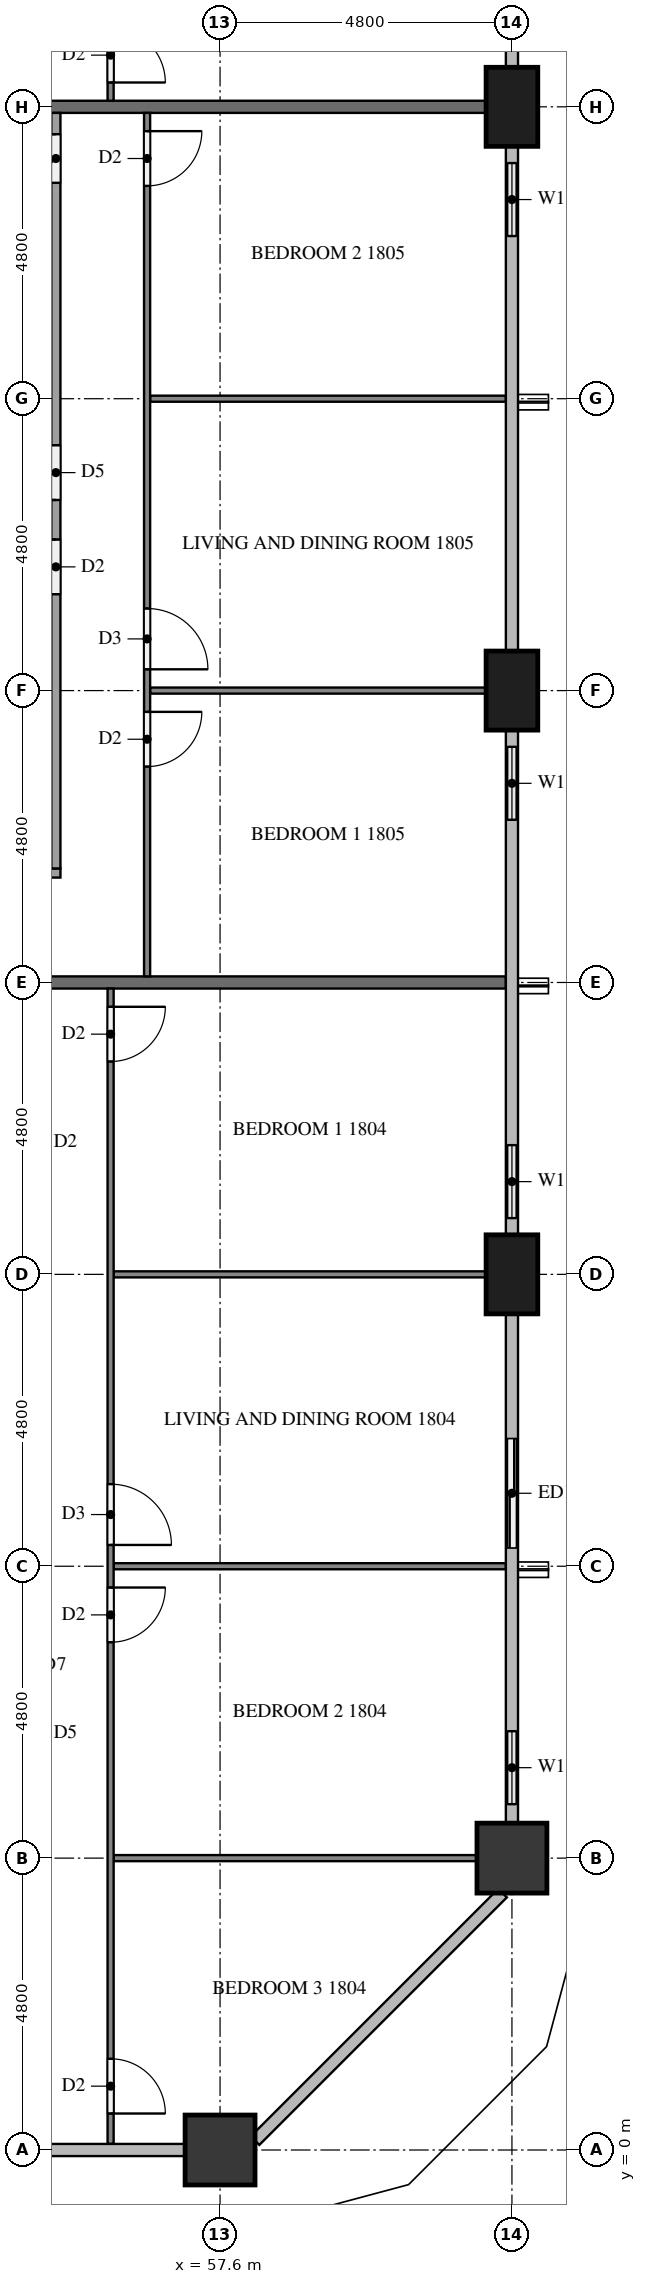
"""IFC4 building model, lengths in metres.
Left out: names, types, materials, properties, quantities, classifications, styles, units other than length and angle.
Written with IfcOpenShell. Run it as: python <this file> out.ifc"""

import sys

from ifc_helpers import new_model, si_unit, direction, frame, frame_2d, origin, origin_2d, place, context, subcontext, project, spatial, rectangle, extrude, element, fill, save


model = new_model("IFC4")
c1 = context("Model", 3, precision=1e-05, world=origin(), true_north=direction((0.0, 1.0)))
c2 = subcontext(c1, "Body", "Model", "MODEL_VIEW")
j1 = project(units=[si_unit("LENGTHUNIT", "METRE"), si_unit("PLANEANGLEUNIT", "RADIAN")], contexts=[c1])
p1 = place(None, origin())
s1 = spatial("IfcSite", under=j1, at=p1, CompositionType="ELEMENT")
p2 = place(p1, origin())
s2 = spatial("IfcBuilding", under=s1, at=p2, CompositionType="ELEMENT")
p3 = place(p2, frame((0.0, 0.0, 73.3)))
s3 = spatial("IfcBuildingStorey", under=s2, at=p3, CompositionType="ELEMENT", Elevation=73.3)
for number, where, z_axis, x_axis in (
    (1, (57.6, 0.0, 0.0), (0.0, 0.0, 1.0), (1.0, 0.0, 0.0)),
    (2, (62.4, 4.8, 0.0), (0.0, 0.0, 1.0), (1.0, 0.0, 0.0)),
):
    element("IfcColumn", number, at=place(p3, frame(where, z_axis=z_axis, x_axis=x_axis)), inside=s3, PredefinedType="COLUMN", context=c2, shape_type="SweptSolid", body=[
        extrude(rectangle(XDim=1.15, YDim=1.15, at=origin_2d()), origin(), (0.0, 0.0, 1.0), 3.2),
    ])
for number, where, z_axis, x_axis in (
    (3, (62.4, 14.4, 0.0), (0.0, 0.0, 1.0), (0.0, 1.0, 0.0)),
    (4, (62.4, 24.0, 0.0), (0.0, 0.0, 1.0), (0.0, 1.0, 0.0)),
    (5, (62.4, 33.6, 0.0), (0.0, 0.0, 1.0), (0.0, 1.0, 0.0)),
):
    element("IfcColumn", number, at=place(p3, frame(where, z_axis=z_axis, x_axis=x_axis)), inside=s3, PredefinedType="COLUMN", context=c2, shape_type="SweptSolid", body=[
        extrude(rectangle(XDim=1.3, YDim=0.85, at=origin_2d()), origin(), (0.0, 0.0, 1.0), 3.2),
    ])
p4 = place(p3, frame((62.4, 5.375, 0.0), z_axis=(0.0, 0.0, 1.0), x_axis=(0.0, 1.0, 0.0)))
e6 = element("IfcWall", 6, at=p4, inside=s3, PredefinedType="SOLIDWALL", context=c2, shape_type="SweptSolid", body=[
    extrude(rectangle(XDim=1.825, YDim=0.15, at=frame_2d((0.913, 0.0))), origin(), (0.0, 0.0, 1.0), 3.2),
])
p5 = place(p4, frame((0.312, 0.0, 0.9)))
e7 = element("IfcOpeningElement", 7, at=p5, cuts=e6, PredefinedType="OPENING", context=c2, shape_type="SweptSolid", body=[
    extrude(rectangle(XDim=1.2, YDim=1.4, at=frame_2d((0.6, 0.7))), frame((0.0, 0.085, 0.0), z_axis=(0.0, -1.0, 0.0), x_axis=(1.0, 0.0, 0.0)), (0.0, 0.0, 1.0), 0.17),
])
p6 = place(p3, frame((62.4, 9.6, 0.0), z_axis=(0.0, 0.0, 1.0), x_axis=(0.0, 1.0, 0.0)))
e8 = element("IfcWall", 8, at=p6, inside=s3, PredefinedType="SOLIDWALL", context=c2, shape_type="SweptSolid", body=[
    extrude(rectangle(XDim=2.4, YDim=0.15, at=frame_2d((1.2, 0.0))), origin(), (0.0, 0.0, 1.0), 3.2),
])
p7 = place(p6, frame((0.3, 0.0, 0.0)))
e9 = element("IfcOpeningElement", 9, at=p7, cuts=e8, PredefinedType="OPENING", context=c2, shape_type="SweptSolid", body=[
    extrude(rectangle(XDim=1.8, YDim=2.4, at=frame_2d((0.9, 1.2))), frame((0.0, 0.085, 0.0), z_axis=(0.0, -1.0, 0.0), x_axis=(1.0, 0.0, 0.0)), (0.0, 0.0, 1.0), 0.17),
])
p8 = place(p3, frame((62.4, 15.05, 0.0), z_axis=(0.0, 0.0, 1.0), x_axis=(0.0, 1.0, 0.0)))
e10 = element("IfcWall", 10, at=p8, inside=s3, PredefinedType="SOLIDWALL", context=c2, shape_type="SweptSolid", body=[
    extrude(rectangle(XDim=1.75, YDim=0.15, at=frame_2d((0.875, 0.0))), origin(), (0.0, 0.0, 1.0), 3.2),
])
p9 = place(p8, frame((0.275, 0.0, 0.9)))
e11 = element("IfcOpeningElement", 11, at=p9, cuts=e10, PredefinedType="OPENING", context=c2, shape_type="SweptSolid", body=[
    extrude(rectangle(XDim=1.2, YDim=1.4, at=frame_2d((0.6, 0.7))), frame((0.0, 0.085, 0.0), z_axis=(0.0, -1.0, 0.0), x_axis=(1.0, 0.0, 0.0)), (0.0, 0.0, 1.0), 0.17),
])
p10 = place(p3, frame((62.4, 21.6, 0.0), z_axis=(0.0, 0.0, 1.0), x_axis=(0.0, 1.0, 0.0)))
e12 = element("IfcWall", 12, at=p10, inside=s3, PredefinedType="SOLIDWALL", context=c2, shape_type="SweptSolid", body=[
    extrude(rectangle(XDim=1.75, YDim=0.15, at=frame_2d((0.875, 0.0))), origin(), (0.0, 0.0, 1.0), 3.2),
])
p11 = place(p10, frame((0.275, 0.0, 0.9)))
e13 = element("IfcOpeningElement", 13, at=p11, cuts=e12, PredefinedType="OPENING", context=c2, shape_type="SweptSolid", body=[
    extrude(rectangle(XDim=1.2, YDim=1.4, at=frame_2d((0.6, 0.7))), frame((0.0, 0.085, 0.0), z_axis=(0.0, -1.0, 0.0), x_axis=(1.0, 0.0, 0.0)), (0.0, 0.0, 1.0), 0.17),
])
p12 = place(p3, frame((62.4, 31.2, 0.0), z_axis=(0.0, 0.0, 1.0), x_axis=(0.0, 1.0, 0.0)))
e14 = element("IfcWall", 14, at=p12, inside=s3, PredefinedType="SOLIDWALL", context=c2, shape_type="SweptSolid", body=[
    extrude(rectangle(XDim=1.75, YDim=0.15, at=frame_2d((0.875, 0.0))), origin(), (0.0, 0.0, 1.0), 3.2),
])
p13 = place(p12, frame((0.275, 0.0, 0.9)))
e15 = element("IfcOpeningElement", 15, at=p13, cuts=e14, PredefinedType="OPENING", context=c2, shape_type="SweptSolid", body=[
    extrude(rectangle(XDim=1.2, YDim=1.4, at=frame_2d((0.6, 0.7))), frame((0.0, 0.085, 0.0), z_axis=(0.0, -1.0, 0.0), x_axis=(1.0, 0.0, 0.0)), (0.0, 0.0, 1.0), 0.17),
])
p14 = place(p3, frame((62.4, 34.25, 0.0), z_axis=(0.0, 0.0, 1.0), x_axis=(0.0, 1.0, 0.0)))
e16 = element("IfcWall", 16, at=p14, inside=s3, PredefinedType="SOLIDWALL", context=c2, shape_type="SweptSolid", body=[
    extrude(rectangle(XDim=1.75, YDim=0.15, at=frame_2d((0.875, 0.0))), origin(), (0.0, 0.0, 1.0), 3.2),
])
p15 = place(p14, frame((0.275, 0.0, 0.9)))
e17 = element("IfcOpeningElement", 17, at=p15, cuts=e16, PredefinedType="OPENING", context=c2, shape_type="SweptSolid", body=[
    extrude(rectangle(XDim=1.2, YDim=1.4, at=frame_2d((0.6, 0.7))), frame((0.0, 0.085, 0.0), z_axis=(0.0, -1.0, 0.0), x_axis=(1.0, 0.0, 0.0)), (0.0, 0.0, 1.0), 0.17),
])
p16 = place(p3, frame((50.5, 19.2, 0.0), z_axis=(0.0, 0.0, 1.0), x_axis=(1.0, 0.0, 0.0)))
e18 = element("IfcWall", 18, at=p16, inside=s3, PredefinedType="PARTITIONING", context=c2, shape_type="SweptSolid", body=[
    extrude(rectangle(XDim=11.8, YDim=0.2, at=frame_2d((5.9, 0.0))), origin(), (0.0, 0.0, 1.0), 3.2),
])
p17 = place(p3, frame((50.5, 33.6, 0.0), z_axis=(0.0, 0.0, 1.0), x_axis=(1.0, 0.0, 0.0)))
e19 = element("IfcWall", 19, at=p17, inside=s3, PredefinedType="PARTITIONING", context=c2, shape_type="SweptSolid", body=[
    extrude(rectangle(XDim=11.475, YDim=0.2, at=frame_2d((5.738, 0.0))), origin(), (0.0, 0.0, 1.0), 3.2),
])
p18 = place(p3, frame((55.85, 14.4, 0.0), z_axis=(0.0, 0.0, 1.0), x_axis=(1.0, 0.0, 0.0)))
e20 = element("IfcWall", 20, at=p18, inside=s3, PredefinedType="PARTITIONING", context=c2, shape_type="SweptSolid", body=[
    extrude(rectangle(XDim=6.125, YDim=0.1, at=frame_2d((3.062, 0.0))), origin(), (0.0, 0.0, 1.0), 3.2),
])
p19 = place(p3, frame((55.85, 9.6, 0.0), z_axis=(0.0, 0.0, 1.0), x_axis=(1.0, 0.0, 0.0)))
e21 = element("IfcWall", 21, at=p19, inside=s3, PredefinedType="PARTITIONING", context=c2, shape_type="SweptSolid", body=[
    extrude(rectangle(XDim=6.45, YDim=0.1, at=frame_2d((3.225, 0.0))), origin(), (0.0, 0.0, 1.0), 3.2),
])
p20 = place(p3, frame((55.85, 4.8, 0.0), z_axis=(0.0, 0.0, 1.0), x_axis=(1.0, 0.0, 0.0)))
e22 = element("IfcWall", 22, at=p20, inside=s3, PredefinedType="PARTITIONING", context=c2, shape_type="SweptSolid", body=[
    extrude(rectangle(XDim=5.975, YDim=0.1, at=frame_2d((2.987, 0.0))), origin(), (0.0, 0.0, 1.0), 3.2),
])
p21 = place(p3, frame((55.8, 19.1, 0.0), z_axis=(0.0, 0.0, 1.0), x_axis=(0.0, -1.0, 0.0)))
e23 = element("IfcWall", 23, at=p21, inside=s3, PredefinedType="PARTITIONING", context=c2, shape_type="SweptSolid", body=[
    extrude(rectangle(XDim=19.0, YDim=0.1, at=frame_2d((9.5, 0.0))), origin(), (0.0, 0.0, 1.0), 3.2),
])
p22 = place(p21, frame((0.3, 0.0, 0.0)))
e24 = element("IfcOpeningElement", 24, at=p22, cuts=e23, PredefinedType="OPENING", context=c2, shape_type="SweptSolid", body=[
    extrude(rectangle(XDim=0.9, YDim=2.1, at=frame_2d((0.45, 1.05))), frame((0.0, 0.06, 0.0), z_axis=(0.0, -1.0, 0.0), x_axis=(1.0, 0.0, 0.0)), (0.0, 0.0, 1.0), 0.12),
])
p23 = place(p21, frame((8.15, 0.0, 0.0)))
e25 = element("IfcOpeningElement", 25, at=p23, cuts=e23, PredefinedType="OPENING", context=c2, shape_type="SweptSolid", body=[
    extrude(rectangle(XDim=1.0, YDim=2.1, at=frame_2d((0.5, 1.05))), frame((0.0, 0.06, 0.0), z_axis=(0.0, -1.0, 0.0), x_axis=(1.0, 0.0, 0.0)), (0.0, 0.0, 1.0), 0.12),
])
p24 = place(p21, frame((9.85, 0.0, 0.0)))
e26 = element("IfcOpeningElement", 26, at=p24, cuts=e23, PredefinedType="OPENING", context=c2, shape_type="SweptSolid", body=[
    extrude(rectangle(XDim=0.9, YDim=2.1, at=frame_2d((0.45, 1.05))), frame((0.0, 0.06, 0.0), z_axis=(0.0, -1.0, 0.0), x_axis=(1.0, 0.0, 0.0)), (0.0, 0.0, 1.0), 0.12),
])
p25 = place(p21, frame((17.6, 0.0, 0.0)))
e27 = element("IfcOpeningElement", 27, at=p25, cuts=e23, PredefinedType="OPENING", context=c2, shape_type="SweptSolid", body=[
    extrude(rectangle(XDim=0.9, YDim=2.1, at=frame_2d((0.45, 1.05))), frame((0.0, 0.06, 0.0), z_axis=(0.0, -1.0, 0.0), x_axis=(1.0, 0.0, 0.0)), (0.0, 0.0, 1.0), 0.12),
])
p26 = place(p3, frame((56.45, 24.0, 0.0), z_axis=(0.0, 0.0, 1.0), x_axis=(1.0, 0.0, 0.0)))
e28 = element("IfcWall", 28, at=p26, inside=s3, PredefinedType="PARTITIONING", context=c2, shape_type="SweptSolid", body=[
    extrude(rectangle(XDim=5.525, YDim=0.1, at=frame_2d((2.763, 0.0))), origin(), (0.0, 0.0, 1.0), 3.2),
])
p27 = place(p3, frame((56.45, 28.8, 0.0), z_axis=(0.0, 0.0, 1.0), x_axis=(1.0, 0.0, 0.0)))
e29 = element("IfcWall", 29, at=p27, inside=s3, PredefinedType="PARTITIONING", context=c2, shape_type="SweptSolid", body=[
    extrude(rectangle(XDim=5.85, YDim=0.1, at=frame_2d((2.925, 0.0))), origin(), (0.0, 0.0, 1.0), 3.2),
])
p28 = place(p3, frame((56.4, 33.5, 0.0), z_axis=(0.0, 0.0, 1.0), x_axis=(0.0, -1.0, 0.0)))
e30 = element("IfcWall", 30, at=p28, inside=s3, PredefinedType="PARTITIONING", context=c2, shape_type="SweptSolid", body=[
    extrude(rectangle(XDim=14.2, YDim=0.1, at=frame_2d((7.1, 0.0))), origin(), (0.0, 0.0, 1.0), 3.2),
])
p29 = place(p28, frame((9.85, 0.0, 0.0)))
e31 = element("IfcOpeningElement", 31, at=p29, cuts=e30, PredefinedType="OPENING", context=c2, shape_type="SweptSolid", body=[
    extrude(rectangle(XDim=0.9, YDim=2.1, at=frame_2d((0.45, 1.05))), frame((0.0, 0.06, 0.0), z_axis=(0.0, -1.0, 0.0), x_axis=(1.0, 0.0, 0.0)), (0.0, 0.0, 1.0), 0.12),
])
p30 = place(p28, frame((8.15, 0.0, 0.0)))
e32 = element("IfcOpeningElement", 32, at=p30, cuts=e30, PredefinedType="OPENING", context=c2, shape_type="SweptSolid", body=[
    extrude(rectangle(XDim=1.0, YDim=2.1, at=frame_2d((0.5, 1.05))), frame((0.0, 0.06, 0.0), z_axis=(0.0, -1.0, 0.0), x_axis=(1.0, 0.0, 0.0)), (0.0, 0.0, 1.0), 0.12),
])
p31 = place(p28, frame((0.3, 0.0, 0.0)))
e33 = element("IfcOpeningElement", 33, at=p31, cuts=e30, PredefinedType="OPENING", context=c2, shape_type="SweptSolid", body=[
    extrude(rectangle(XDim=0.9, YDim=2.1, at=frame_2d((0.45, 1.05))), frame((0.0, 0.06, 0.0), z_axis=(0.0, -1.0, 0.0), x_axis=(1.0, 0.0, 0.0)), (0.0, 0.0, 1.0), 0.12),
])
p32 = place(p3, frame((50.5, 21.0, 0.0), z_axis=(0.0, 0.0, 1.0), x_axis=(1.0, 0.0, 0.0)))
e34 = element("IfcWall", 34, at=p32, inside=s3, PredefinedType="PARTITIONING", context=c2, shape_type="SweptSolid", body=[
    extrude(rectangle(XDim=4.475, YDim=0.15, at=frame_2d((2.238, 0.0))), origin(), (0.0, 0.0, 1.0), 3.2),
])
p33 = place(p3, frame((54.9, 21.075, 0.0), z_axis=(0.0, 0.0, 1.0), x_axis=(0.0, 1.0, 0.0)))
e35 = element("IfcWall", 35, at=p33, inside=s3, PredefinedType="PARTITIONING", context=c2, shape_type="SweptSolid", body=[
    extrude(rectangle(XDim=12.425, YDim=0.15, at=frame_2d((6.212, 0.0))), origin(), (0.0, 0.0, 1.0), 3.2),
])
p34 = place(p33, frame((4.51, 0.0, 0.0)))
e36 = element("IfcOpeningElement", 36, at=p34, cuts=e35, PredefinedType="OPENING", context=c2, shape_type="SweptSolid", body=[
    extrude(rectangle(XDim=0.9, YDim=2.1, at=frame_2d((0.45, 1.05))), frame((0.0, 0.085, 0.0), z_axis=(0.0, -1.0, 0.0), x_axis=(1.0, 0.0, 0.0)), (0.0, 0.0, 1.0), 0.17),
])
p35 = place(p33, frame((6.06, 0.0, 0.0)))
e37 = element("IfcOpeningElement", 37, at=p35, cuts=e35, PredefinedType="OPENING", context=c2, shape_type="SweptSolid", body=[
    extrude(rectangle(XDim=0.9, YDim=2.1, at=frame_2d((0.45, 1.05))), frame((0.0, 0.085, 0.0), z_axis=(0.0, -1.0, 0.0), x_axis=(1.0, 0.0, 0.0)), (0.0, 0.0, 1.0), 0.17),
])
p36 = place(p33, frame((11.275, 0.0, 0.0)))
e38 = element("IfcOpeningElement", 38, at=p36, cuts=e35, PredefinedType="OPENING", context=c2, shape_type="SweptSolid", body=[
    extrude(rectangle(XDim=0.8, YDim=2.1, at=frame_2d((0.4, 1.05))), frame((0.0, 0.085, 0.0), z_axis=(0.0, -1.0, 0.0), x_axis=(1.0, 0.0, 0.0)), (0.0, 0.0, 1.0), 0.17),
])
p37 = place(p3, frame((55.8, 47.9, 0.0), z_axis=(0.0, 0.0, 1.0), x_axis=(0.0, -1.0, 0.0)))
e39 = element("IfcWall", 39, at=p37, inside=s3, PredefinedType="PARTITIONING", context=c2, shape_type="SweptSolid", body=[
    extrude(rectangle(XDim=14.2, YDim=0.1, at=frame_2d((7.1, 0.0))), origin(), (0.0, 0.0, 1.0), 3.2),
])
p38 = place(p37, frame((13.0, 0.0, 0.0)))
e40 = element("IfcOpeningElement", 40, at=p38, cuts=e39, PredefinedType="OPENING", context=c2, shape_type="SweptSolid", body=[
    extrude(rectangle(XDim=0.9, YDim=2.1, at=frame_2d((0.45, 1.05))), frame((0.0, 0.06, 0.0), z_axis=(0.0, -1.0, 0.0), x_axis=(1.0, 0.0, 0.0)), (0.0, 0.0, 1.0), 0.12),
])
p39 = place(p37, frame((5.05, 0.0, 0.0)))
e41 = element("IfcOpeningElement", 41, at=p39, cuts=e39, PredefinedType="OPENING", context=c2, shape_type="SweptSolid", body=[
    extrude(rectangle(XDim=0.9, YDim=2.1, at=frame_2d((0.45, 1.05))), frame((0.0, 0.06, 0.0), z_axis=(0.0, -1.0, 0.0), x_axis=(1.0, 0.0, 0.0)), (0.0, 0.0, 1.0), 0.12),
])
p40 = place(p37, frame((3.35, 0.0, 0.0)))
e42 = element("IfcOpeningElement", 42, at=p40, cuts=e39, PredefinedType="OPENING", context=c2, shape_type="SweptSolid", body=[
    extrude(rectangle(XDim=1.0, YDim=2.1, at=frame_2d((0.5, 1.05))), frame((0.0, 0.06, 0.0), z_axis=(0.0, -1.0, 0.0), x_axis=(1.0, 0.0, 0.0)), (0.0, 0.0, 1.0), 0.12),
])
p41 = place(p5, origin())
e43 = element("IfcWindow", 43, at=p41, inside=s3, PartitioningType="SINGLE_PANEL", PredefinedType="WINDOW", context=c2, shape_type="SweptSolid", body=[
    extrude(rectangle(XDim=1.2, YDim=1.4, at=frame_2d((0.6, 0.7))), frame((0.0, 0.03, 0.0), z_axis=(0.0, -1.0, 0.0), x_axis=(1.0, 0.0, 0.0)), (0.0, 0.0, 1.0), 0.06),
])
fill(e7, e43)
p42 = place(p7, origin())
e44 = element("IfcDoor", 44, at=p42, inside=s3, OperationType="SLIDING_TO_LEFT", PredefinedType="DOOR", context=c2, shape_type="SweptSolid", body=[
    extrude(rectangle(XDim=1.8, YDim=2.4, at=frame_2d((0.9, 1.2))), frame((0.0, 0.025, 0.0), z_axis=(0.0, -1.0, 0.0), x_axis=(1.0, 0.0, 0.0)), (0.0, 0.0, 1.0), 0.05),
])
fill(e9, e44)
p43 = place(p9, origin())
e45 = element("IfcWindow", 45, at=p43, inside=s3, PartitioningType="SINGLE_PANEL", PredefinedType="WINDOW", context=c2, shape_type="SweptSolid", body=[
    extrude(rectangle(XDim=1.2, YDim=1.4, at=frame_2d((0.6, 0.7))), frame((0.0, 0.03, 0.0), z_axis=(0.0, -1.0, 0.0), x_axis=(1.0, 0.0, 0.0)), (0.0, 0.0, 1.0), 0.06),
])
fill(e11, e45)
p44 = place(p11, origin())
e46 = element("IfcWindow", 46, at=p44, inside=s3, PartitioningType="SINGLE_PANEL", PredefinedType="WINDOW", context=c2, shape_type="SweptSolid", body=[
    extrude(rectangle(XDim=1.2, YDim=1.4, at=frame_2d((0.6, 0.7))), frame((0.0, 0.03, 0.0), z_axis=(0.0, -1.0, 0.0), x_axis=(1.0, 0.0, 0.0)), (0.0, 0.0, 1.0), 0.06),
])
fill(e13, e46)
p45 = place(p13, origin())
e47 = element("IfcWindow", 47, at=p45, inside=s3, PartitioningType="SINGLE_PANEL", PredefinedType="WINDOW", context=c2, shape_type="SweptSolid", body=[
    extrude(rectangle(XDim=1.2, YDim=1.4, at=frame_2d((0.6, 0.7))), frame((0.0, 0.03, 0.0), z_axis=(0.0, -1.0, 0.0), x_axis=(1.0, 0.0, 0.0)), (0.0, 0.0, 1.0), 0.06),
])
fill(e15, e47)
p46 = place(p22, origin())
e48 = element("IfcDoor", 48, at=p46, inside=s3, OperationType="SINGLE_SWING_LEFT", PredefinedType="DOOR", context=c2, shape_type="SweptSolid", body=[
    extrude(rectangle(XDim=0.9, YDim=2.1, at=frame_2d((0.45, 1.05))), frame((0.0, 0.025, 0.0), z_axis=(0.0, -1.0, 0.0), x_axis=(1.0, 0.0, 0.0)), (0.0, 0.0, 1.0), 0.05),
])
fill(e24, e48)
p47 = place(p23, origin())
e49 = element("IfcDoor", 49, at=p47, inside=s3, OperationType="SINGLE_SWING_RIGHT", PredefinedType="DOOR", context=c2, shape_type="SweptSolid", body=[
    extrude(rectangle(XDim=1.0, YDim=2.1, at=frame_2d((0.5, 1.05))), frame((0.0, 0.025, 0.0), z_axis=(0.0, -1.0, 0.0), x_axis=(1.0, 0.0, 0.0)), (0.0, 0.0, 1.0), 0.05),
])
fill(e25, e49)
p48 = place(p24, origin())
e50 = element("IfcDoor", 50, at=p48, inside=s3, OperationType="SINGLE_SWING_LEFT", PredefinedType="DOOR", context=c2, shape_type="SweptSolid", body=[
    extrude(rectangle(XDim=0.9, YDim=2.1, at=frame_2d((0.45, 1.05))), frame((0.0, 0.025, 0.0), z_axis=(0.0, -1.0, 0.0), x_axis=(1.0, 0.0, 0.0)), (0.0, 0.0, 1.0), 0.05),
])
fill(e26, e50)
p49 = place(p25, origin())
e51 = element("IfcDoor", 51, at=p49, inside=s3, OperationType="SINGLE_SWING_RIGHT", PredefinedType="DOOR", context=c2, shape_type="SweptSolid", body=[
    extrude(rectangle(XDim=0.9, YDim=2.1, at=frame_2d((0.45, 1.05))), frame((0.0, 0.025, 0.0), z_axis=(0.0, -1.0, 0.0), x_axis=(1.0, 0.0, 0.0)), (0.0, 0.0, 1.0), 0.05),
])
fill(e27, e51)
p50 = place(p29, origin())
e52 = element("IfcDoor", 52, at=p50, inside=s3, OperationType="SINGLE_SWING_LEFT", PredefinedType="DOOR", context=c2, shape_type="SweptSolid", body=[
    extrude(rectangle(XDim=0.9, YDim=2.1, at=frame_2d((0.45, 1.05))), frame((0.0, 0.025, 0.0), z_axis=(0.0, -1.0, 0.0), x_axis=(1.0, 0.0, 0.0)), (0.0, 0.0, 1.0), 0.05),
])
fill(e31, e52)
p51 = place(p30, origin())
e53 = element("IfcDoor", 53, at=p51, inside=s3, OperationType="SINGLE_SWING_RIGHT", PredefinedType="DOOR", context=c2, shape_type="SweptSolid", body=[
    extrude(rectangle(XDim=1.0, YDim=2.1, at=frame_2d((0.5, 1.05))), frame((0.0, 0.025, 0.0), z_axis=(0.0, -1.0, 0.0), x_axis=(1.0, 0.0, 0.0)), (0.0, 0.0, 1.0), 0.05),
])
fill(e32, e53)
p52 = place(p31, origin())
e54 = element("IfcDoor", 54, at=p52, inside=s3, OperationType="SINGLE_SWING_LEFT", PredefinedType="DOOR", context=c2, shape_type="SweptSolid", body=[
    extrude(rectangle(XDim=0.9, YDim=2.1, at=frame_2d((0.45, 1.05))), frame((0.0, 0.025, 0.0), z_axis=(0.0, -1.0, 0.0), x_axis=(1.0, 0.0, 0.0)), (0.0, 0.0, 1.0), 0.05),
])
fill(e33, e54)
p53 = place(p34, origin())
e55 = element("IfcDoor", 55, at=p53, inside=s3, OperationType="SINGLE_SWING_RIGHT", PredefinedType="DOOR", context=c2, shape_type="SweptSolid", body=[
    extrude(rectangle(XDim=0.9, YDim=2.1, at=frame_2d((0.45, 1.05))), frame((0.0, 0.025, 0.0), z_axis=(0.0, -1.0, 0.0), x_axis=(1.0, 0.0, 0.0)), (0.0, 0.0, 1.0), 0.05),
])
fill(e36, e55)
p54 = place(p35, origin())
e56 = element("IfcDoor", 56, at=p54, inside=s3, OperationType="SINGLE_SWING_LEFT", PredefinedType="DOOR", context=c2, shape_type="SweptSolid", body=[
    extrude(rectangle(XDim=0.9, YDim=2.1, at=frame_2d((0.45, 1.05))), frame((0.0, 0.025, 0.0), z_axis=(0.0, -1.0, 0.0), x_axis=(1.0, 0.0, 0.0)), (0.0, 0.0, 1.0), 0.05),
])
fill(e37, e56)
p55 = place(p36, origin())
e57 = element("IfcDoor", 57, at=p55, inside=s3, OperationType="SINGLE_SWING_RIGHT", PredefinedType="DOOR", context=c2, shape_type="SweptSolid", body=[
    extrude(rectangle(XDim=0.8, YDim=2.1, at=frame_2d((0.4, 1.05))), frame((0.0, 0.025, 0.0), z_axis=(0.0, -1.0, 0.0), x_axis=(1.0, 0.0, 0.0)), (0.0, 0.0, 1.0), 0.05),
])
fill(e38, e57)
p56 = place(p38, origin())
e58 = element("IfcDoor", 58, at=p56, inside=s3, OperationType="SINGLE_SWING_RIGHT", PredefinedType="DOOR", context=c2, shape_type="SweptSolid", body=[
    extrude(rectangle(XDim=0.9, YDim=2.1, at=frame_2d((0.45, 1.05))), frame((0.0, 0.025, 0.0), z_axis=(0.0, -1.0, 0.0), x_axis=(1.0, 0.0, 0.0)), (0.0, 0.0, 1.0), 0.05),
])
fill(e40, e58)
save(model, sys.argv[1])
